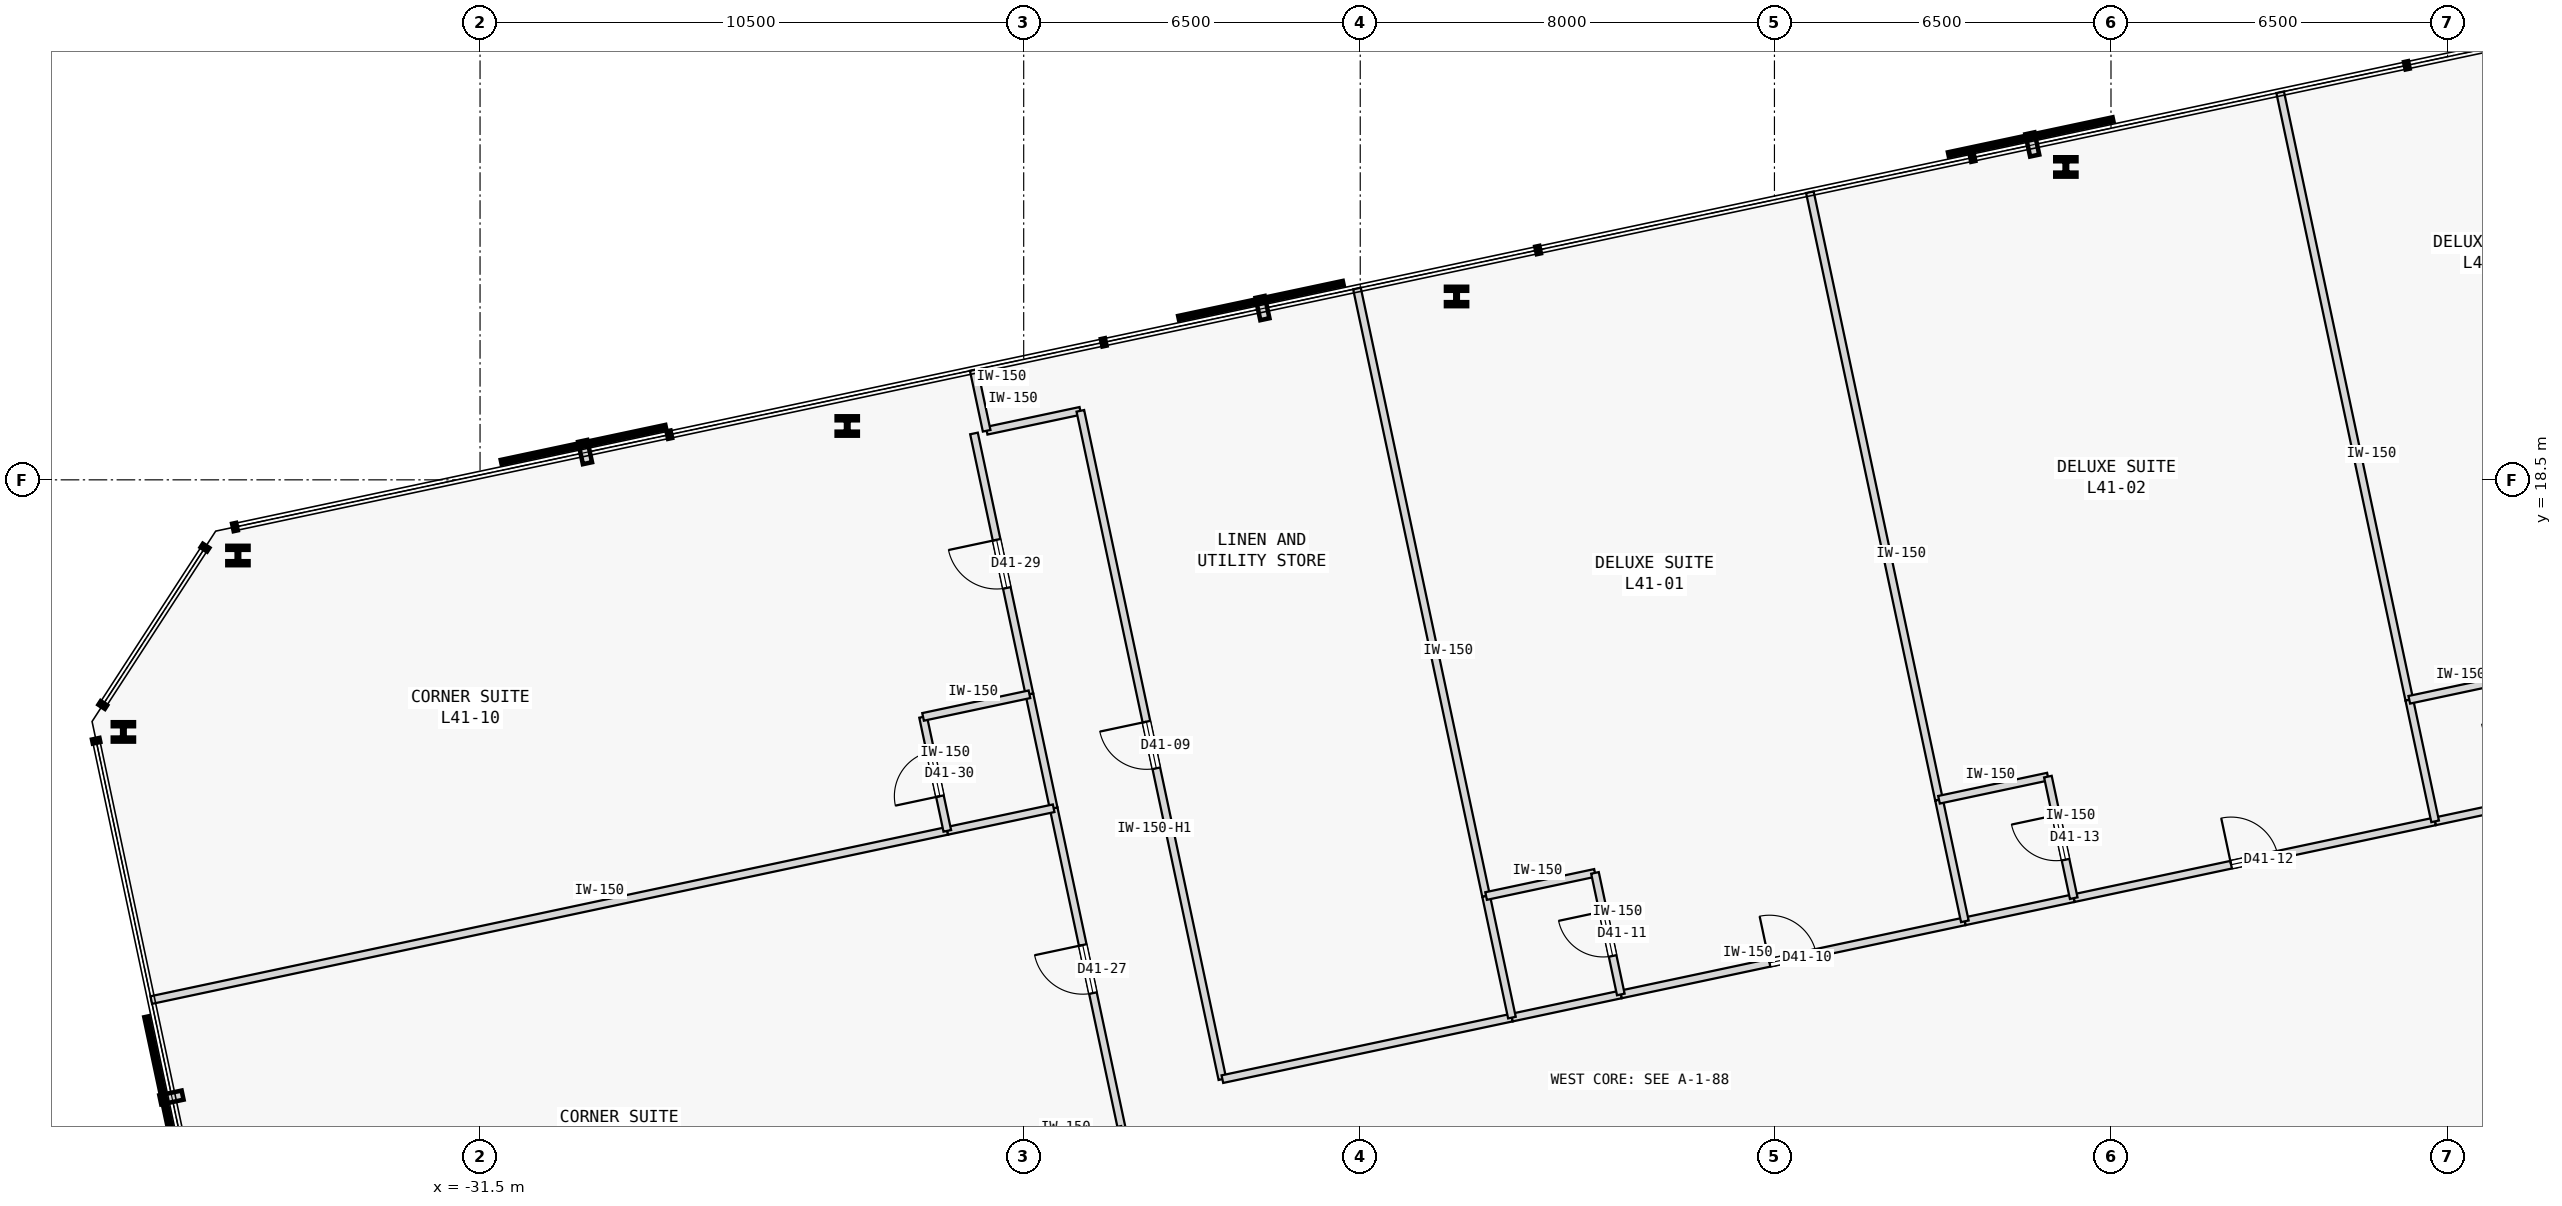
"""IFC4 building model, lengths in metres.
Left out: names, types, materials, properties, quantities, classifications, styles, units other than length and angle.
Written with IfcOpenShell. Run it as: python <this file> out.ifc"""

import sys

from ifc_helpers import new_model, si_unit, direction, frame, frame_2d, origin, origin_2d, place, context, subcontext, project, spatial, rectangle, i_section, extrude, element, fill, save


model = new_model("IFC4")
c1 = context("Model", 3, precision=1e-05, world=origin(), true_north=direction((0.0, 1.0)))
c2 = subcontext(c1, "Body", "Model", "MODEL_VIEW")
j1 = project(units=[si_unit("LENGTHUNIT", "METRE"), si_unit("PLANEANGLEUNIT", "RADIAN")], contexts=[c1])
p1 = place(None, origin())
s1 = spatial("IfcSite", under=j1, at=p1, CompositionType="ELEMENT")
p2 = place(p1, origin())
s2 = spatial("IfcBuilding", under=s1, at=p2, CompositionType="ELEMENT")
p3 = place(p2, frame((0.0, 0.0, 161.6)))
s3 = spatial("IfcBuildingStorey", under=s2, at=p3, CompositionType="ELEMENT", Elevation=161.6)
for number, where, z_axis, x_axis in (
    (1, (-0.872, 24.543, 0.0), (0.0, 0.0, 1.0), (1.0, 0.0, 0.0)),
    (2, (-12.64, 22.042, 0.0), (0.0, 0.0, 1.0), (1.0, 0.0, 0.0)),
    (3, (-24.408, 19.54, 0.0), (0.0, 0.0, 1.0), (1.0, 0.0, 0.0)),
    (4, (-36.176, 17.039, 0.0), (0.0, 0.0, 1.0), (1.0, 0.0, 0.0)),
    (5, (-38.389, 13.632, 0.0), (0.0, 0.0, 1.0), (1.0, 0.0, 0.0)),
):
    element("IfcColumn", number, at=place(p3, frame(where, z_axis=z_axis, x_axis=x_axis)), inside=s3, PredefinedType="COLUMN", context=c2, shape_type="SweptSolid", body=[
        extrude(i_section(OverallWidth=0.409, OverallDepth=0.374, WebThickness=0.048, FlangeThickness=0.077, FilletRadius=0.015, at=origin_2d()), origin(), (0.0, 0.0, 1.0), 3.4),
    ])
p4 = place(p3, frame((-21.715, 19.448, 0.0), z_axis=(0.0, 0.0, 1.0), x_axis=(0.978160192495, 0.207852442415, 0.0)))
e6 = element("IfcWall", 6, at=p4, inside=s3, PredefinedType="PARTITIONING", context=c2, shape_type="SweptSolid", body=[
    extrude(rectangle(XDim=1.85, YDim=0.15, at=frame_2d((0.925, 0.0))), origin(), (0.0, 0.0, 1.0), 3.175),
])
p5 = place(p3, frame((-17.162, 6.926, 0.0), z_axis=(0.0, 0.0, 1.0), x_axis=(-0.207911421929, 0.978147657888, 0.0)))
e7 = element("IfcWall", 7, at=p5, inside=s3, PredefinedType="PARTITIONING", context=c2, shape_type="SweptSolid", body=[
    extrude(rectangle(XDim=13.195, YDim=0.15, at=frame_2d((6.598, 0.0))), origin(), (0.0, 0.0, 1.0), 2.725),
])
p6 = place(p5, frame((6.137, 0.0, 0.0)))
e8 = element("IfcOpeningElement", 8, at=p6, cuts=e7, PredefinedType="OPENING", context=c2, shape_type="SweptSolid", body=[
    extrude(rectangle(XDim=0.92, YDim=2.15, at=frame_2d((0.46, 1.075))), frame((0.0, 0.085, 0.0), z_axis=(0.0, -1.0, 0.0), x_axis=(1.0, 0.0, 0.0)), (0.0, 0.0, 1.0), 0.17),
])
p7 = place(p3, frame((-17.162, 6.926, 0.0), z_axis=(0.0, 0.0, 1.0), x_axis=(0.978144196583, 0.207927705443, 0.0)))
e9 = element("IfcWall", 9, at=p7, inside=s3, PredefinedType="PARTITIONING", context=c2, shape_type="SweptSolid", body=[
    extrude(rectangle(XDim=5.717, YDim=0.15, at=frame_2d((2.858, 0.0))), origin(), (0.0, 0.0, 1.0), 3.175),
])
p8 = place(p3, frame((-9.467, 8.562, 0.0), z_axis=(0.0, 0.0, 1.0), x_axis=(0.978147157672, 0.207913775247, 0.0)))
e10 = element("IfcWall", 10, at=p8, inside=s3, PredefinedType="PARTITIONING", context=c2, shape_type="SweptSolid", body=[
    extrude(rectangle(XDim=6.793, YDim=0.15, at=frame_2d((3.396, 0.0))), origin(), (0.0, 0.0, 1.0), 3.175),
])
p9 = place(p8, frame((2.937, 0.0, 0.0)))
e11 = element("IfcOpeningElement", 11, at=p9, cuts=e10, PredefinedType="OPENING", context=c2, shape_type="SweptSolid", body=[
    extrude(rectangle(XDim=0.92, YDim=2.15, at=frame_2d((0.46, 1.075))), frame((0.0, 0.085, 0.0), z_axis=(0.0, -1.0, 0.0), x_axis=(1.0, 0.0, 0.0)), (0.0, 0.0, 1.0), 0.17),
])
p10 = place(p3, frame((-11.57, 8.115, 0.0), z_axis=(0.0, 0.0, 1.0), x_axis=(0.978146728319, 0.207915795165, 0.0)))
e12 = element("IfcWall", 12, at=p10, inside=s3, PredefinedType="PARTITIONING", context=c2, shape_type="SweptSolid", body=[
    extrude(rectangle(XDim=2.15, YDim=0.15, at=frame_2d((1.075, 0.0))), origin(), (0.0, 0.0, 1.0), 3.175),
])
p11 = place(p3, frame((-0.72, 10.421, 0.0), z_axis=(0.0, 0.0, 1.0), x_axis=(0.978147545754, 0.207911949477, 0.0)))
e13 = element("IfcWall", 13, at=p11, inside=s3, PredefinedType="PARTITIONING", context=c2, shape_type="SweptSolid", body=[
    extrude(rectangle(XDim=7.136, YDim=0.15, at=frame_2d((3.568, 0.0))), origin(), (0.0, 0.0, 1.0), 3.175),
])
p12 = place(p11, frame((3.108, 0.0, 0.0)))
e14 = element("IfcOpeningElement", 14, at=p12, cuts=e13, PredefinedType="OPENING", context=c2, shape_type="SweptSolid", body=[
    extrude(rectangle(XDim=0.92, YDim=2.15, at=frame_2d((0.46, 1.075))), frame((0.0, 0.085, 0.0), z_axis=(0.0, -1.0, 0.0), x_axis=(1.0, 0.0, 0.0)), (0.0, 0.0, 1.0), 0.17),
])
for number, where, z_axis, x_axis in (
    (15, (-2.823, 9.974, 0.0), (0.0, 0.0, 1.0), (0.978, 0.208, 0.0)),
    (16, (6.26, 11.905, 0.0), (0.0, 0.0, 1.0), (0.978, 0.208, 0.0)),
):
    element("IfcWall", number, at=place(p3, frame(where, z_axis=z_axis, x_axis=x_axis)), inside=s3, PredefinedType="PARTITIONING", context=c2, shape_type="SweptSolid", body=[
        extrude(rectangle(XDim=2.15, YDim=0.15, at=frame_2d((1.075, 0.0))), origin(), (0.0, 0.0, 1.0), 3.175),
    ])
p13 = place(p3, frame((-19.101, 5.946, 0.0), z_axis=(0.0, 0.0, 1.0), x_axis=(-0.207916691923, 0.978146537703, 0.0)))
e17 = element("IfcWall", 17, at=p13, inside=s3, PredefinedType="PARTITIONING", context=c2, shape_type="SweptSolid", body=[
    extrude(rectangle(XDim=6.35, YDim=0.15, at=frame_2d((3.175, 0.0))), origin(), (0.0, 0.0, 1.0), 3.175),
])
p14 = place(p13, frame((2.7, 0.0, 0.0)))
e18 = element("IfcOpeningElement", 18, at=p14, cuts=e17, PredefinedType="OPENING", context=c2, shape_type="SweptSolid", body=[
    extrude(rectangle(XDim=0.95, YDim=2.15, at=frame_2d((0.475, 1.075))), frame((0.0, 0.085, 0.0), z_axis=(0.0, -1.0, 0.0), x_axis=(1.0, 0.0, 0.0)), (0.0, 0.0, 1.0), 0.17),
])
p15 = place(p3, frame((-20.889, 14.358, 0.0), z_axis=(0.0, 0.0, 1.0), x_axis=(-0.207916584961, 0.978146560439, 0.0)))
e19 = element("IfcWall", 19, at=p15, inside=s3, PredefinedType="PARTITIONING", context=c2, shape_type="SweptSolid", body=[
    extrude(rectangle(XDim=5.15, YDim=0.15, at=frame_2d((2.575, 0.0))), origin(), (0.0, 0.0, 1.0), 3.175),
])
p16 = place(p15, frame((2.1, 0.0, 0.0)))
e20 = element("IfcOpeningElement", 20, at=p16, cuts=e19, PredefinedType="OPENING", context=c2, shape_type="SweptSolid", body=[
    extrude(rectangle(XDim=0.95, YDim=2.15, at=frame_2d((0.475, 1.075))), frame((0.0, 0.085, 0.0), z_axis=(0.0, -1.0, 0.0), x_axis=(1.0, 0.0, 0.0)), (0.0, 0.0, 1.0), 0.17),
])
p17 = place(p3, frame((-20.421, 12.158, 0.0), z_axis=(0.0, 0.0, 1.0), x_axis=(-0.207913264065, 0.978147266328, 0.0)))
e21 = element("IfcWall", 21, at=p17, inside=s3, PredefinedType="PARTITIONING", context=c2, shape_type="SweptSolid", body=[
    extrude(rectangle(XDim=2.25, YDim=0.15, at=frame_2d((1.125, 0.0))), origin(), (0.0, 0.0, 1.0), 3.175),
])
p18 = place(p3, frame((-12.069, 10.462, 0.0), z_axis=(0.0, 0.0, 1.0), x_axis=(-0.207914988081, 0.978146899873, 0.0)))
e22 = element("IfcWall", 22, at=p18, inside=s3, PredefinedType="PARTITIONING", context=c2, shape_type="SweptSolid", body=[
    extrude(rectangle(XDim=11.995, YDim=0.15, at=frame_2d((5.998, 0.0))), origin(), (0.0, 0.0, 1.0), 3.175),
])
p19 = place(p3, frame((-11.57, 8.115, 0.0), z_axis=(0.0, 0.0, 1.0), x_axis=(-0.207917150959, 0.978146440129, 0.0)))
e23 = element("IfcWall", 23, at=p19, inside=s3, PredefinedType="PARTITIONING", context=c2, shape_type="SweptSolid", body=[
    extrude(rectangle(XDim=2.4, YDim=0.15, at=frame_2d((1.2, 0.0))), origin(), (0.0, 0.0, 1.0), 3.175),
])
p20 = place(p3, frame((-21.715, 19.448, 0.0), z_axis=(0.0, 0.0, 1.0), x_axis=(-0.20795853359, 0.978137642823, 0.0)))
e24 = element("IfcWall", 24, at=p20, inside=s3, PredefinedType="PARTITIONING", context=c2, shape_type="SweptSolid", body=[
    extrude(rectangle(XDim=1.2, YDim=0.15, at=frame_2d((0.6, 0.0))), origin(), (0.0, 0.0, 1.0), 3.175),
])
p21 = place(p3, frame((-12.069, 10.462, 0.0), z_axis=(0.0, 0.0, 1.0), x_axis=(0.978146728319, 0.207915795165, 0.0)))
e25 = element("IfcWall", 25, at=p21, inside=s3, PredefinedType="PARTITIONING", context=c2, shape_type="SweptSolid", body=[
    extrude(rectangle(XDim=2.15, YDim=0.15, at=frame_2d((1.075, 0.0))), origin(), (0.0, 0.0, 1.0), 3.175),
])
p22 = place(p3, frame((-9.467, 8.562, 0.0), z_axis=(0.0, 0.0, 1.0), x_axis=(-0.207917150959, 0.978146440129, 0.0)))
e26 = element("IfcWall", 26, at=p22, inside=s3, PredefinedType="PARTITIONING", context=c2, shape_type="SweptSolid", body=[
    extrude(rectangle(XDim=2.4, YDim=0.15, at=frame_2d((1.2, 0.0))), origin(), (0.0, 0.0, 1.0), 3.175),
])
p23 = place(p22, frame((0.76, 0.0, 0.0)))
e27 = element("IfcOpeningElement", 27, at=p23, cuts=e26, PredefinedType="OPENING", context=c2, shape_type="SweptSolid", body=[
    extrude(rectangle(XDim=0.88, YDim=2.15, at=frame_2d((0.44, 1.075))), frame((0.0, 0.085, 0.0), z_axis=(0.0, -1.0, 0.0), x_axis=(1.0, 0.0, 0.0)), (0.0, 0.0, 1.0), 0.17),
])
p24 = place(p3, frame((-3.322, 12.321, 0.0), z_axis=(0.0, 0.0, 1.0), x_axis=(-0.207910848762, 0.978147779718, 0.0)))
e28 = element("IfcWall", 28, at=p24, inside=s3, PredefinedType="PARTITIONING", context=c2, shape_type="SweptSolid", body=[
    extrude(rectangle(XDim=11.995, YDim=0.15, at=frame_2d((5.998, 0.0))), origin(), (0.0, 0.0, 1.0), 3.175),
])
p25 = place(p3, frame((-2.823, 9.974, 0.0), z_axis=(0.0, 0.0, 1.0), x_axis=(-0.207937840262, 0.978142042133, 0.0)))
e29 = element("IfcWall", 29, at=p25, inside=s3, PredefinedType="PARTITIONING", context=c2, shape_type="SweptSolid", body=[
    extrude(rectangle(XDim=2.4, YDim=0.15, at=frame_2d((1.2, 0.0))), origin(), (0.0, 0.0, 1.0), 3.175),
])
p26 = place(p3, frame((-3.322, 12.321, 0.0), z_axis=(0.0, 0.0, 1.0), x_axis=(0.978146728319, 0.207915795165, 0.0)))
e30 = element("IfcWall", 30, at=p26, inside=s3, PredefinedType="PARTITIONING", context=c2, shape_type="SweptSolid", body=[
    extrude(rectangle(XDim=2.15, YDim=0.15, at=frame_2d((1.075, 0.0))), origin(), (0.0, 0.0, 1.0), 3.175),
])
p27 = place(p3, frame((-0.72, 10.421, 0.0), z_axis=(0.0, 0.0, 1.0), x_axis=(-0.207937840262, 0.978142042133, 0.0)))
e31 = element("IfcWall", 31, at=p27, inside=s3, PredefinedType="PARTITIONING", context=c2, shape_type="SweptSolid", body=[
    extrude(rectangle(XDim=2.4, YDim=0.15, at=frame_2d((1.2, 0.0))), origin(), (0.0, 0.0, 1.0), 3.175),
])
p28 = place(p27, frame((0.76, 0.0, 0.0)))
e32 = element("IfcOpeningElement", 32, at=p28, cuts=e31, PredefinedType="OPENING", context=c2, shape_type="SweptSolid", body=[
    extrude(rectangle(XDim=0.88, YDim=2.15, at=frame_2d((0.44, 1.075))), frame((0.0, 0.085, 0.0), z_axis=(0.0, -1.0, 0.0), x_axis=(1.0, 0.0, 0.0)), (0.0, 0.0, 1.0), 0.17),
])
p29 = place(p3, frame((5.761, 14.252, 0.0), z_axis=(0.0, 0.0, 1.0), x_axis=(-0.207910848762, 0.978147779718, 0.0)))
e33 = element("IfcWall", 33, at=p29, inside=s3, PredefinedType="PARTITIONING", context=c2, shape_type="SweptSolid", body=[
    extrude(rectangle(XDim=11.995, YDim=0.15, at=frame_2d((5.998, 0.0))), origin(), (0.0, 0.0, 1.0), 3.175),
])
p30 = place(p3, frame((6.26, 11.905, 0.0), z_axis=(0.0, 0.0, 1.0), x_axis=(-0.207917150959, 0.978146440129, 0.0)))
e34 = element("IfcWall", 34, at=p30, inside=s3, PredefinedType="PARTITIONING", context=c2, shape_type="SweptSolid", body=[
    extrude(rectangle(XDim=2.4, YDim=0.15, at=frame_2d((1.2, 0.0))), origin(), (0.0, 0.0, 1.0), 3.175),
])
p31 = place(p3, frame((5.761, 14.252, 0.0), z_axis=(0.0, 0.0, 1.0), x_axis=(0.978146728319, 0.207915795165, 0.0)))
e35 = element("IfcWall", 35, at=p31, inside=s3, PredefinedType="PARTITIONING", context=c2, shape_type="SweptSolid", body=[
    extrude(rectangle(XDim=2.15, YDim=0.15, at=frame_2d((1.075, 0.0))), origin(), (0.0, 0.0, 1.0), 3.175),
])
p32 = place(p3, frame((-37.85, 8.453, 0.0), z_axis=(0.0, 0.0, 1.0), x_axis=(0.978149296727, 0.207903711638, 0.0)))
e36 = element("IfcWall", 36, at=p32, inside=s3, PredefinedType="PARTITIONING", context=c2, shape_type="SweptSolid", body=[
    extrude(rectangle(XDim=15.718, YDim=0.15, at=frame_2d((7.859, 0.0))), origin(), (0.0, 0.0, 1.0), 3.175),
])
p33 = place(p3, frame((-22.476, 11.721, 0.0), z_axis=(0.0, 0.0, 1.0), x_axis=(0.978134617382, 0.207972763311, 0.0)))
e37 = element("IfcWall", 37, at=p33, inside=s3, PredefinedType="PARTITIONING", context=c2, shape_type="SweptSolid", body=[
    extrude(rectangle(XDim=2.1, YDim=0.15, at=frame_2d((1.05, 0.0))), origin(), (0.0, 0.0, 1.0), 3.175),
])
p34 = place(p3, frame((-22.476, 11.721, 0.0), z_axis=(0.0, 0.0, 1.0), x_axis=(-0.207891197838, 0.978151956427, 0.0)))
e38 = element("IfcWall", 38, at=p34, inside=s3, PredefinedType="PARTITIONING", context=c2, shape_type="SweptSolid", body=[
    extrude(rectangle(XDim=2.25, YDim=0.15, at=frame_2d((1.125, 0.0))), origin(), (0.0, 0.0, 1.0), 3.175),
])
p35 = place(p34, frame((0.685, 0.0, 0.0)))
e39 = element("IfcOpeningElement", 39, at=p35, cuts=e38, PredefinedType="OPENING", context=c2, shape_type="SweptSolid", body=[
    extrude(rectangle(XDim=0.88, YDim=2.15, at=frame_2d((0.44, 1.075))), frame((0.0, 0.085, 0.0), z_axis=(0.0, -1.0, 0.0), x_axis=(1.0, 0.0, 0.0)), (0.0, 0.0, 1.0), 0.17),
])
p36 = place(p3, frame((-22.943, 13.922, 0.0), z_axis=(0.0, 0.0, 1.0), x_axis=(0.97815826, 0.207861536591, 0.0)))
e40 = element("IfcWall", 40, at=p36, inside=s3, PredefinedType="PARTITIONING", context=c2, shape_type="SweptSolid", body=[
    extrude(rectangle(XDim=2.1, YDim=0.15, at=frame_2d((1.05, 0.0))), origin(), (0.0, 0.0, 1.0), 3.175),
])
p37 = place(p6, origin())
e41 = element("IfcDoor", 41, at=p37, inside=s3, OperationType="SINGLE_SWING_RIGHT", PredefinedType="DOOR", context=c2, shape_type="SweptSolid", body=[
    extrude(rectangle(XDim=0.92, YDim=2.15, at=frame_2d((0.46, 1.075))), frame((0.0, 0.025, 0.0), z_axis=(0.0, -1.0, 0.0), x_axis=(1.0, 0.0, 0.0)), (0.0, 0.0, 1.0), 0.05),
])
fill(e8, e41)
p38 = place(p9, origin())
e42 = element("IfcDoor", 42, at=p38, inside=s3, OperationType="SINGLE_SWING_LEFT", PredefinedType="DOOR", context=c2, shape_type="SweptSolid", body=[
    extrude(rectangle(XDim=0.92, YDim=2.15, at=frame_2d((0.46, 1.075))), frame((0.0, 0.025, 0.0), z_axis=(0.0, -1.0, 0.0), x_axis=(1.0, 0.0, 0.0)), (0.0, 0.0, 1.0), 0.05),
])
fill(e11, e42)
p39 = place(p23, origin())
e43 = element("IfcDoor", 43, at=p39, inside=s3, OperationType="SINGLE_SWING_RIGHT", PredefinedType="DOOR", context=c2, shape_type="SweptSolid", body=[
    extrude(rectangle(XDim=0.88, YDim=2.15, at=frame_2d((0.44, 1.075))), frame((0.0, 0.025, 0.0), z_axis=(0.0, -1.0, 0.0), x_axis=(1.0, 0.0, 0.0)), (0.0, 0.0, 1.0), 0.05),
])
fill(e27, e43)
p40 = place(p12, origin())
e44 = element("IfcDoor", 44, at=p40, inside=s3, OperationType="SINGLE_SWING_LEFT", PredefinedType="DOOR", context=c2, shape_type="SweptSolid", body=[
    extrude(rectangle(XDim=0.92, YDim=2.15, at=frame_2d((0.46, 1.075))), frame((0.0, 0.025, 0.0), z_axis=(0.0, -1.0, 0.0), x_axis=(1.0, 0.0, 0.0)), (0.0, 0.0, 1.0), 0.05),
])
fill(e14, e44)
p41 = place(p28, origin())
e45 = element("IfcDoor", 45, at=p41, inside=s3, OperationType="SINGLE_SWING_RIGHT", PredefinedType="DOOR", context=c2, shape_type="SweptSolid", body=[
    extrude(rectangle(XDim=0.88, YDim=2.15, at=frame_2d((0.44, 1.075))), frame((0.0, 0.025, 0.0), z_axis=(0.0, -1.0, 0.0), x_axis=(1.0, 0.0, 0.0)), (0.0, 0.0, 1.0), 0.05),
])
fill(e32, e45)
p42 = place(p14, origin())
e46 = element("IfcDoor", 46, at=p42, inside=s3, OperationType="SINGLE_SWING_RIGHT", PredefinedType="DOOR", context=c2, shape_type="SweptSolid", body=[
    extrude(rectangle(XDim=0.95, YDim=2.15, at=frame_2d((0.475, 1.075))), frame((0.0, 0.025, 0.0), z_axis=(0.0, -1.0, 0.0), x_axis=(1.0, 0.0, 0.0)), (0.0, 0.0, 1.0), 0.05),
])
fill(e18, e46)
p43 = place(p16, origin())
e47 = element("IfcDoor", 47, at=p43, inside=s3, OperationType="SINGLE_SWING_RIGHT", PredefinedType="DOOR", context=c2, shape_type="SweptSolid", body=[
    extrude(rectangle(XDim=0.95, YDim=2.15, at=frame_2d((0.475, 1.075))), frame((0.0, 0.025, 0.0), z_axis=(0.0, -1.0, 0.0), x_axis=(1.0, 0.0, 0.0)), (0.0, 0.0, 1.0), 0.05),
])
fill(e20, e47)
p44 = place(p35, origin())
e48 = element("IfcDoor", 48, at=p44, inside=s3, OperationType="SINGLE_SWING_LEFT", PredefinedType="DOOR", context=c2, shape_type="SweptSolid", body=[
    extrude(rectangle(XDim=0.88, YDim=2.15, at=frame_2d((0.44, 1.075))), frame((0.0, 0.025, 0.0), z_axis=(0.0, -1.0, 0.0), x_axis=(1.0, 0.0, 0.0)), (0.0, 0.0, 1.0), 0.05),
])
fill(e39, e48)
save(model, sys.argv[1])
